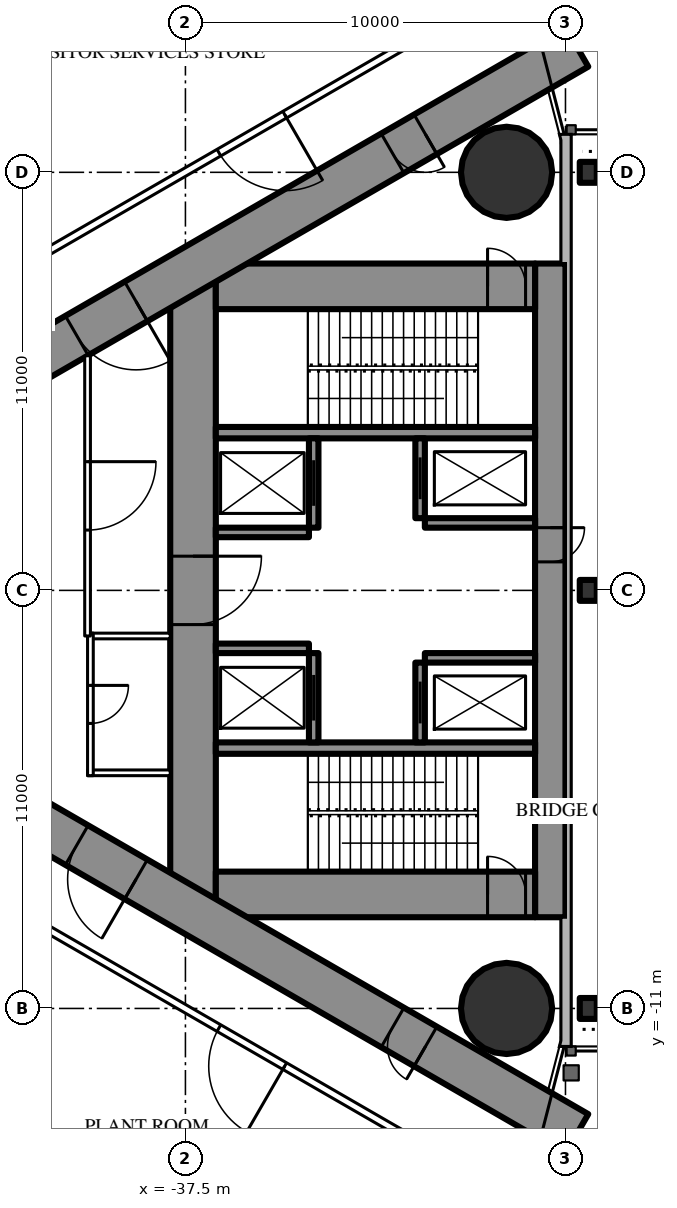
"""IFC4 building model, lengths in metres.
Left out: names, types, materials, properties, quantities, classifications, styles, units other than length and angle.
Written with IfcOpenShell. Run it as: python <this file> out.ifc"""

import sys

from ifc_helpers import new_model, si_unit, direction, frame, frame_2d, origin, origin_2d, place, context, subcontext, project, spatial, rectangle, circle, i_section, extrude, element, fill, save


model = new_model("IFC4")
c1 = context("Model", 3, precision=1e-05, world=origin(), true_north=direction((0.0, 1.0)))
c2 = subcontext(c1, "Body", "Model", "MODEL_VIEW")
j1 = project(units=[si_unit("LENGTHUNIT", "METRE"), si_unit("PLANEANGLEUNIT", "RADIAN")], contexts=[c1])
p1 = place(None, origin())
s1 = spatial("IfcSite", under=j1, at=p1, CompositionType="ELEMENT")
p2 = place(p1, origin())
s2 = spatial("IfcBuilding", under=s1, at=p2, CompositionType="ELEMENT")
p3 = place(p2, frame((0.0, 0.0, 257.3)))
s3 = spatial("IfcBuildingStorey", under=s2, at=p3, CompositionType="ELEMENT", Elevation=257.3)
for number, where, z_axis, x_axis in (
    (1, (-29.05, -11.0, 0.0), (0.0, 0.0, 1.0), (1.0, 0.0, 0.0)),
    (2, (-29.05, 11.0, 0.0), (0.0, 0.0, 1.0), (1.0, 0.0, 0.0)),
):
    element("IfcColumn", number, at=place(p3, frame(where, z_axis=z_axis, x_axis=x_axis)), inside=s3, PredefinedType="COLUMN", context=c2, shape_type="SweptSolid", body=[
        extrude(circle(Radius=1.2, at=origin_2d()), origin(), (0.0, 0.0, 1.0), 6.0),
    ])
p4 = place(p3, frame((-27.9, 8.6, 0.0), z_axis=(0.0, 0.0, 1.0), x_axis=(0.0, -1.0, 0.0)))
e3 = element("IfcWall", 3, at=p4, inside=s3, PredefinedType="SHEAR", context=c2, shape_type="SweptSolid", body=[
    extrude(rectangle(XDim=17.2, YDim=0.8, at=frame_2d((8.6, 0.0))), origin(), (0.0, 0.0, 1.0), 6.0),
])
p5 = place(p4, frame((6.95, 0.0, 0.0)))
e4 = element("IfcOpeningElement", 4, at=p5, cuts=e3, PredefinedType="OPENING", context=c2, shape_type="SweptSolid", body=[
    extrude(rectangle(XDim=0.9, YDim=2.2, at=frame_2d((0.45, 1.1))), frame((0.0, 0.41, 0.0), z_axis=(0.0, -1.0, 0.0), x_axis=(1.0, 0.0, 0.0)), (0.0, 0.0, 1.0), 0.82),
])
p6 = place(p3, frame((-37.3, 8.6, 0.0), z_axis=(0.0, 0.0, 1.0), x_axis=(0.0, -1.0, 0.0)))
e5 = element("IfcWall", 5, at=p6, inside=s3, PredefinedType="SHEAR", context=c2, shape_type="SweptSolid", body=[
    extrude(rectangle(XDim=17.2, YDim=1.2, at=frame_2d((8.6, 0.0))), origin(), (0.0, 0.0, 1.0), 6.0),
])
p7 = place(p6, frame((7.7, 0.0, 0.0)))
e6 = element("IfcOpeningElement", 6, at=p7, cuts=e5, PredefinedType="OPENING", context=c2, shape_type="SweptSolid", body=[
    extrude(rectangle(XDim=1.8, YDim=2.2, at=frame_2d((0.9, 1.1))), frame((0.0, 0.61, 0.0), z_axis=(0.0, -1.0, 0.0), x_axis=(1.0, 0.0, 0.0)), (0.0, 0.0, 1.0), 1.22),
])
p8 = place(p3, frame((-28.3, 8.0, 0.0), z_axis=(0.0, 0.0, 1.0), x_axis=(-1.0, 0.0, 0.0)))
e7 = element("IfcWall", 7, at=p8, inside=s3, PredefinedType="SHEAR", context=c2, shape_type="SweptSolid", body=[
    extrude(rectangle(XDim=8.4, YDim=1.2, at=frame_2d((4.2, 0.0))), origin(), (0.0, 0.0, 1.0), 6.0),
])
p9 = place(p8, frame((0.25, 0.0, 0.0)))
e8 = element("IfcOpeningElement", 8, at=p9, cuts=e7, PredefinedType="OPENING", context=c2, shape_type="SweptSolid", body=[
    extrude(rectangle(XDim=1.0, YDim=2.2, at=frame_2d((0.5, 1.1))), frame((0.0, 0.61, 0.0), z_axis=(0.0, -1.0, 0.0), x_axis=(1.0, 0.0, 0.0)), (0.0, 0.0, 1.0), 1.22),
])
p10 = place(p3, frame((-28.3, -8.0, 0.0), z_axis=(0.0, 0.0, 1.0), x_axis=(-1.0, 0.0, 0.0)))
e9 = element("IfcWall", 9, at=p10, inside=s3, PredefinedType="SHEAR", context=c2, shape_type="SweptSolid", body=[
    extrude(rectangle(XDim=8.4, YDim=1.2, at=frame_2d((4.2, 0.0))), origin(), (0.0, 0.0, 1.0), 6.0),
])
p11 = place(p10, frame((0.25, 0.0, 0.0)))
e10 = element("IfcOpeningElement", 10, at=p11, cuts=e9, PredefinedType="OPENING", context=c2, shape_type="SweptSolid", body=[
    extrude(rectangle(XDim=1.0, YDim=2.2, at=frame_2d((0.5, 1.1))), frame((0.0, 0.61, 0.0), z_axis=(0.0, -1.0, 0.0), x_axis=(1.0, 0.0, 0.0)), (0.0, 0.0, 1.0), 1.22),
])
for number, where, z_axis, x_axis in (
    (11, (-28.3, 4.15, 0.0), (0.0, 0.0, 1.0), (-1.0, 0.0, 0.0)),
    (12, (-28.3, -4.15, 0.0), (0.0, 0.0, 1.0), (-1.0, 0.0, 0.0)),
):
    element("IfcWall", number, at=place(p3, frame(where, z_axis=z_axis, x_axis=x_axis)), inside=s3, PredefinedType="SHEAR", context=c2, shape_type="SweptSolid", body=[
        extrude(rectangle(XDim=8.4, YDim=0.3, at=frame_2d((4.2, 0.0))), origin(), (0.0, 0.0, 1.0), 6.0),
    ])
p12 = place(p3, frame((-31.325, 4.0, 0.0), z_axis=(0.0, 0.0, 1.0), x_axis=(0.0, -1.0, 0.0)))
e13 = element("IfcWall", 13, at=p12, inside=s3, PredefinedType="SHEAR", context=c2, shape_type="SweptSolid", body=[
    extrude(rectangle(XDim=2.1, YDim=0.25, at=frame_2d((1.05, 0.0))), origin(), (0.0, 0.0, 1.0), 6.0),
])
p13 = place(p12, frame((0.5, 0.0, 0.0)))
e14 = element("IfcOpeningElement", 14, at=p13, cuts=e13, PredefinedType="OPENING", context=c2, shape_type="SweptSolid", body=[
    extrude(rectangle(XDim=1.1, YDim=2.2, at=frame_2d((0.55, 1.1))), frame((0.0, 0.135, 0.0), z_axis=(0.0, -1.0, 0.0), x_axis=(1.0, 0.0, 0.0)), (0.0, 0.0, 1.0), 0.27),
])
p14 = place(p3, frame((-34.125, 4.0, 0.0), z_axis=(0.0, 0.0, 1.0), x_axis=(0.0, -1.0, 0.0)))
e15 = element("IfcWall", 15, at=p14, inside=s3, PredefinedType="SHEAR", context=c2, shape_type="SweptSolid", body=[
    extrude(rectangle(XDim=2.35, YDim=0.25, at=frame_2d((1.175, 0.0))), origin(), (0.0, 0.0, 1.0), 6.0),
])
p15 = place(p14, frame((0.575, 0.0, 0.0)))
e16 = element("IfcOpeningElement", 16, at=p15, cuts=e15, PredefinedType="OPENING", context=c2, shape_type="SweptSolid", body=[
    extrude(rectangle(XDim=1.2, YDim=2.2, at=frame_2d((0.6, 1.1))), frame((0.0, 0.135, 0.0), z_axis=(0.0, -1.0, 0.0), x_axis=(1.0, 0.0, 0.0)), (0.0, 0.0, 1.0), 0.27),
])
p16 = place(p3, frame((-28.3, 1.775, 0.0), z_axis=(0.0, 0.0, 1.0), x_axis=(-1.0, 0.0, 0.0)))
e17 = element("IfcWall", 17, at=p16, inside=s3, PredefinedType="SHEAR", context=c2, shape_type="SweptSolid", body=[
    extrude(rectangle(XDim=2.9, YDim=0.25, at=frame_2d((1.45, 0.0))), origin(), (0.0, 0.0, 1.0), 6.0),
])
p17 = place(p3, frame((-34.25, 1.525, 0.0), z_axis=(0.0, 0.0, 1.0), x_axis=(-1.0, 0.0, 0.0)))
e18 = element("IfcWall", 18, at=p17, inside=s3, PredefinedType="SHEAR", context=c2, shape_type="SweptSolid", body=[
    extrude(rectangle(XDim=2.45, YDim=0.25, at=frame_2d((1.225, 0.0))), origin(), (0.0, 0.0, 1.0), 6.0),
])
p18 = place(p3, frame((-31.325, -1.9, 0.0), z_axis=(0.0, 0.0, 1.0), x_axis=(0.0, -1.0, 0.0)))
e19 = element("IfcWall", 19, at=p18, inside=s3, PredefinedType="SHEAR", context=c2, shape_type="SweptSolid", body=[
    extrude(rectangle(XDim=2.1, YDim=0.25, at=frame_2d((1.05, 0.0))), origin(), (0.0, 0.0, 1.0), 6.0),
])
p19 = place(p18, frame((0.5, 0.0, 0.0)))
e20 = element("IfcOpeningElement", 20, at=p19, cuts=e19, PredefinedType="OPENING", context=c2, shape_type="SweptSolid", body=[
    extrude(rectangle(XDim=1.1, YDim=2.2, at=frame_2d((0.55, 1.1))), frame((0.0, 0.135, 0.0), z_axis=(0.0, -1.0, 0.0), x_axis=(1.0, 0.0, 0.0)), (0.0, 0.0, 1.0), 0.27),
])
p20 = place(p3, frame((-34.125, -1.65, 0.0), z_axis=(0.0, 0.0, 1.0), x_axis=(0.0, -1.0, 0.0)))
e21 = element("IfcWall", 21, at=p20, inside=s3, PredefinedType="SHEAR", context=c2, shape_type="SweptSolid", body=[
    extrude(rectangle(XDim=2.35, YDim=0.25, at=frame_2d((1.175, 0.0))), origin(), (0.0, 0.0, 1.0), 6.0),
])
p21 = place(p20, frame((0.575, 0.0, 0.0)))
e22 = element("IfcOpeningElement", 22, at=p21, cuts=e21, PredefinedType="OPENING", context=c2, shape_type="SweptSolid", body=[
    extrude(rectangle(XDim=1.2, YDim=2.2, at=frame_2d((0.6, 1.1))), frame((0.0, 0.135, 0.0), z_axis=(0.0, -1.0, 0.0), x_axis=(1.0, 0.0, 0.0)), (0.0, 0.0, 1.0), 0.27),
])
p22 = place(p3, frame((-28.3, -1.775, 0.0), z_axis=(0.0, 0.0, 1.0), x_axis=(-1.0, 0.0, 0.0)))
e23 = element("IfcWall", 23, at=p22, inside=s3, PredefinedType="SHEAR", context=c2, shape_type="SweptSolid", body=[
    extrude(rectangle(XDim=2.9, YDim=0.25, at=frame_2d((1.45, 0.0))), origin(), (0.0, 0.0, 1.0), 6.0),
])
p23 = place(p3, frame((-34.25, -1.525, 0.0), z_axis=(0.0, 0.0, 1.0), x_axis=(-1.0, 0.0, 0.0)))
e24 = element("IfcWall", 24, at=p23, inside=s3, PredefinedType="SHEAR", context=c2, shape_type="SweptSolid", body=[
    extrude(rectangle(XDim=2.45, YDim=0.25, at=frame_2d((1.225, 0.0))), origin(), (0.0, 0.0, 1.0), 6.0),
])
p24 = place(p3, frame((-27.2, 14.3, 0.0), z_axis=(0.0, 0.0, 1.0), x_axis=(-0.866026593062, -0.499997940104, 0.0)))
e25 = element("IfcWall", 25, at=p24, inside=s3, PredefinedType="SHEAR", context=c2, shape_type="SweptSolid", body=[
    extrude(rectangle(XDim=28.946, YDim=1.2, at=frame_2d((14.473, 0.0))), origin(), (0.0, 0.0, 1.0), 6.0),
])
p25 = place(p24, frame((4.6, 0.0, 0.0)))
e26 = element("IfcOpeningElement", 26, at=p25, cuts=e25, PredefinedType="OPENING", context=c2, shape_type="SweptSolid", body=[
    extrude(rectangle(XDim=1.0, YDim=2.2, at=frame_2d((0.5, 1.1))), frame((0.0, 0.61, 0.0), z_axis=(0.0, -1.0, 0.0), x_axis=(1.0, 0.0, 0.0)), (0.0, 0.0, 1.0), 1.22),
])
p26 = place(p24, frame((13.395, 0.0, 0.0)))
e27 = element("IfcOpeningElement", 27, at=p26, cuts=e25, PredefinedType="OPENING", context=c2, shape_type="SweptSolid", body=[
    extrude(rectangle(XDim=1.8, YDim=2.2, at=frame_2d((0.9, 1.1))), frame((0.0, 0.61, 0.0), z_axis=(0.0, -1.0, 0.0), x_axis=(1.0, 0.0, 0.0)), (0.0, 0.0, 1.0), 1.22),
])
p27 = place(p3, frame((-27.2, -14.3, 0.0), z_axis=(0.0, 0.0, 1.0), x_axis=(-0.866024021859, 0.500002393557, 0.0)))
e28 = element("IfcWall", 28, at=p27, inside=s3, PredefinedType="SHEAR", context=c2, shape_type="SweptSolid", body=[
    extrude(rectangle(XDim=27.907, YDim=1.2, at=frame_2d((13.954, 0.0))), origin(), (0.0, 0.0, 1.0), 6.0),
])
p28 = place(p27, frame((4.6, 0.0, 0.0)))
e29 = element("IfcOpeningElement", 29, at=p28, cuts=e28, PredefinedType="OPENING", context=c2, shape_type="SweptSolid", body=[
    extrude(rectangle(XDim=1.0, YDim=2.2, at=frame_2d((0.5, 1.1))), frame((0.0, 0.61, 0.0), z_axis=(0.0, -1.0, 0.0), x_axis=(1.0, 0.0, 0.0)), (0.0, 0.0, 1.0), 1.22),
])
p29 = place(p27, frame((13.395, 0.0, 0.0)))
e30 = element("IfcOpeningElement", 30, at=p29, cuts=e28, PredefinedType="OPENING", context=c2, shape_type="SweptSolid", body=[
    extrude(rectangle(XDim=1.8, YDim=2.2, at=frame_2d((0.9, 1.1))), frame((0.0, 0.61, 0.0), z_axis=(0.0, -1.0, 0.0), x_axis=(1.0, 0.0, 0.0)), (0.0, 0.0, 1.0), 1.22),
])
for number, where, z_axis, x_axis in (
    (31, (-26.9, -11.0, 0.0), (0.0, 0.0, 1.0), (1.0, 0.0, 0.0)),
    (32, (-26.9, 0.0, 0.0), (0.0, 0.0, 1.0), (1.0, 0.0, 0.0)),
    (33, (-26.9, 11.0, 0.0), (0.0, 0.0, 1.0), (1.0, 0.0, 0.0)),
):
    element("IfcColumn", number, at=place(p3, frame(where, z_axis=z_axis, x_axis=x_axis)), inside=s3, PredefinedType="COLUMN", context=c2, shape_type="SweptSolid", body=[
        extrude(i_section(OverallWidth=0.448, OverallDepth=0.55, WebThickness=0.072, FlangeThickness=0.115, FilletRadius=0.02, at=origin_2d()), origin(), (0.0, 0.0, 1.0), 6.0),
    ])
p30 = place(p3, frame((-28.681, 16.101, 0.0), z_axis=(0.0, 0.0, 1.0), x_axis=(-0.866024860443, -0.500000941094, 0.0)))
e34 = element("IfcWall", 34, at=p30, inside=s3, PredefinedType="PARTITIONING", context=c2, shape_type="SweptSolid", body=[
    extrude(rectangle(XDim=32.201, YDim=0.2, at=frame_2d((16.101, 0.0))), origin(), (0.0, 0.0, 1.0), 5.75),
])
p31 = place(p30, frame((7.166, 0.0, 0.0)))
e35 = element("IfcOpeningElement", 35, at=p31, cuts=e34, PredefinedType="OPENING", context=c2, shape_type="SweptSolid", body=[
    extrude(rectangle(XDim=2.0, YDim=2.4, at=frame_2d((1.0, 1.2))), frame((0.0, 0.11, 0.0), z_axis=(0.0, -1.0, 0.0), x_axis=(1.0, 0.0, 0.0)), (0.0, 0.0, 1.0), 0.22),
])
p32 = place(p30, frame((17.281, 0.0, 0.0)))
e36 = element("IfcOpeningElement", 36, at=p32, cuts=e34, PredefinedType="OPENING", context=c2, shape_type="SweptSolid", body=[
    extrude(rectangle(XDim=1.8, YDim=2.2, at=frame_2d((0.9, 1.1))), frame((0.0, 0.11, 0.0), z_axis=(0.0, -1.0, 0.0), x_axis=(1.0, 0.0, 0.0)), (0.0, 0.0, 1.0), 0.22),
])
p33 = place(p30, frame((21.43, 0.0, 0.0)))
e37 = element("IfcOpeningElement", 37, at=p33, cuts=e34, PredefinedType="OPENING", context=c2, shape_type="SweptSolid", body=[
    extrude(rectangle(XDim=1.8, YDim=2.2, at=frame_2d((0.9, 1.1))), frame((0.0, 0.11, 0.0), z_axis=(0.0, -1.0, 0.0), x_axis=(1.0, 0.0, 0.0)), (0.0, 0.0, 1.0), 0.22),
])
p34 = place(p30, frame((27.19, 0.0, 0.0)))
e38 = element("IfcOpeningElement", 38, at=p34, cuts=e34, PredefinedType="OPENING", context=c2, shape_type="SweptSolid", body=[
    extrude(rectangle(XDim=2.0, YDim=2.4, at=frame_2d((1.0, 1.2))), frame((0.0, 0.11, 0.0), z_axis=(0.0, -1.0, 0.0), x_axis=(1.0, 0.0, 0.0)), (0.0, 0.0, 1.0), 0.22),
])
p35 = place(p3, frame((-28.681, -16.101, 0.0), z_axis=(0.0, 0.0, 1.0), x_axis=(-0.86602501917, 0.50000066617, 0.0)))
e39 = element("IfcWall", 39, at=p35, inside=s3, PredefinedType="PARTITIONING", context=c2, shape_type="SweptSolid", body=[
    extrude(rectangle(XDim=32.081, YDim=0.2, at=frame_2d((16.041, 0.0))), origin(), (0.0, 0.0, 1.0), 5.75),
])
p36 = place(p35, frame((27.13, 0.0, 0.0)))
e40 = element("IfcOpeningElement", 40, at=p36, cuts=e39, PredefinedType="OPENING", context=c2, shape_type="SweptSolid", body=[
    extrude(rectangle(XDim=2.0, YDim=2.4, at=frame_2d((1.0, 1.2))), frame((0.0, 0.11, 0.0), z_axis=(0.0, -1.0, 0.0), x_axis=(1.0, 0.0, 0.0)), (0.0, 0.0, 1.0), 0.22),
])
p37 = place(p35, frame((21.43, 0.0, 0.0)))
e41 = element("IfcOpeningElement", 41, at=p37, cuts=e39, PredefinedType="OPENING", context=c2, shape_type="SweptSolid", body=[
    extrude(rectangle(XDim=1.8, YDim=2.2, at=frame_2d((0.9, 1.1))), frame((0.0, 0.11, 0.0), z_axis=(0.0, -1.0, 0.0), x_axis=(1.0, 0.0, 0.0)), (0.0, 0.0, 1.0), 0.22),
])
p38 = place(p35, frame((17.281, 0.0, 0.0)))
e42 = element("IfcOpeningElement", 42, at=p38, cuts=e39, PredefinedType="OPENING", context=c2, shape_type="SweptSolid", body=[
    extrude(rectangle(XDim=1.8, YDim=2.2, at=frame_2d((0.9, 1.1))), frame((0.0, 0.11, 0.0), z_axis=(0.0, -1.0, 0.0), x_axis=(1.0, 0.0, 0.0)), (0.0, 0.0, 1.0), 0.22),
])
p39 = place(p35, frame((7.166, 0.0, 0.0)))
e43 = element("IfcOpeningElement", 43, at=p39, cuts=e39, PredefinedType="OPENING", context=c2, shape_type="SweptSolid", body=[
    extrude(rectangle(XDim=2.0, YDim=2.4, at=frame_2d((1.0, 1.2))), frame((0.0, 0.11, 0.0), z_axis=(0.0, -1.0, 0.0), x_axis=(1.0, 0.0, 0.0)), (0.0, 0.0, 1.0), 0.22),
])
for number, where, z_axis, x_axis in (
    (44, (-37.9, -1.2, 0.0), (0.0, 0.0, 1.0), (-1.0, 0.0, 0.0)),
    (45, (-37.9, -4.8, 0.0), (0.0, 0.0, 1.0), (-1.0, 0.0, 0.0)),
):
    element("IfcWall", number, at=place(p3, frame(where, z_axis=z_axis, x_axis=x_axis)), inside=s3, PredefinedType="PARTITIONING", context=c2, shape_type="SweptSolid", body=[
        extrude(rectangle(XDim=2.175, YDim=0.15, at=frame_2d((1.087, 0.0))), origin(), (0.0, 0.0, 1.0), 5.75),
    ])
p40 = place(p3, frame((-40.0, -1.125, 0.0), z_axis=(0.0, 0.0, 1.0), x_axis=(0.0, -1.0, 0.0)))
e46 = element("IfcWall", 46, at=p40, inside=s3, PredefinedType="PARTITIONING", context=c2, shape_type="SweptSolid", body=[
    extrude(rectangle(XDim=3.75, YDim=0.15, at=frame_2d((1.875, 0.0))), origin(), (0.0, 0.0, 1.0), 5.75),
])
p41 = place(p40, frame((1.375, 0.0, 0.0)))
e47 = element("IfcOpeningElement", 47, at=p41, cuts=e46, PredefinedType="OPENING", context=c2, shape_type="SweptSolid", body=[
    extrude(rectangle(XDim=1.0, YDim=2.2, at=frame_2d((0.5, 1.1))), frame((0.0, 0.085, 0.0), z_axis=(0.0, -1.0, 0.0), x_axis=(1.0, 0.0, 0.0)), (0.0, 0.0, 1.0), 0.17),
])
p42 = place(p3, frame((-40.075, 6.174, 0.0), z_axis=(0.0, 0.0, 1.0), x_axis=(0.0, -1.0, 0.0)))
e48 = element("IfcWall", 48, at=p42, inside=s3, PredefinedType="PARTITIONING", context=c2, shape_type="SweptSolid", body=[
    extrude(rectangle(XDim=7.374, YDim=0.15, at=frame_2d((3.687, 0.0))), origin(), (0.0, 0.0, 1.0), 5.75),
])
p43 = place(p42, frame((2.787, 0.0, 0.0)))
e49 = element("IfcOpeningElement", 49, at=p43, cuts=e48, PredefinedType="OPENING", context=c2, shape_type="SweptSolid", body=[
    extrude(rectangle(XDim=1.8, YDim=2.2, at=frame_2d((0.9, 1.1))), frame((0.0, 0.085, 0.0), z_axis=(0.0, -1.0, 0.0), x_axis=(1.0, 0.0, 0.0)), (0.0, 0.0, 1.0), 0.17),
])
p44 = place(p31, origin())
e50 = element("IfcDoor", 50, at=p44, inside=s3, OperationType="DOUBLE_DOOR_SINGLE_SWING", PredefinedType="DOOR", context=c2, shape_type="SweptSolid", body=[
    extrude(rectangle(XDim=2.0, YDim=2.4, at=frame_2d((1.0, 1.2))), frame((0.0, 0.025, 0.0), z_axis=(0.0, -1.0, 0.0), x_axis=(1.0, 0.0, 0.0)), (0.0, 0.0, 1.0), 0.05),
])
fill(e35, e50)
p45 = place(p39, origin())
e51 = element("IfcDoor", 51, at=p45, inside=s3, OperationType="DOUBLE_DOOR_SINGLE_SWING", PredefinedType="DOOR", context=c2, shape_type="SweptSolid", body=[
    extrude(rectangle(XDim=2.0, YDim=2.4, at=frame_2d((1.0, 1.2))), frame((0.0, 0.025, 0.0), z_axis=(0.0, -1.0, 0.0), x_axis=(1.0, 0.0, 0.0)), (0.0, 0.0, 1.0), 0.05),
])
fill(e43, e51)
p46 = place(p41, origin())
e52 = element("IfcDoor", 52, at=p46, inside=s3, OperationType="SINGLE_SWING_LEFT", PredefinedType="DOOR", context=c2, shape_type="SweptSolid", body=[
    extrude(rectangle(XDim=1.0, YDim=2.2, at=frame_2d((0.5, 1.1))), frame((0.0, 0.025, 0.0), z_axis=(0.0, -1.0, 0.0), x_axis=(1.0, 0.0, 0.0)), (0.0, 0.0, 1.0), 0.05),
])
fill(e47, e52)
p47 = place(p43, origin())
e53 = element("IfcDoor", 53, at=p47, inside=s3, OperationType="DOUBLE_DOOR_SINGLE_SWING", PredefinedType="DOOR", context=c2, shape_type="SweptSolid", body=[
    extrude(rectangle(XDim=1.8, YDim=2.2, at=frame_2d((0.9, 1.1))), frame((0.0, 0.025, 0.0), z_axis=(0.0, -1.0, 0.0), x_axis=(1.0, 0.0, 0.0)), (0.0, 0.0, 1.0), 0.05),
])
fill(e49, e53)
p48 = place(p25, origin())
e54 = element("IfcDoor", 54, at=p48, inside=s3, OperationType="SINGLE_SWING_LEFT", PredefinedType="DOOR", context=c2, shape_type="SweptSolid", body=[
    extrude(rectangle(XDim=1.0, YDim=2.2, at=frame_2d((0.5, 1.1))), frame((0.0, 0.025, 0.0), z_axis=(0.0, -1.0, 0.0), x_axis=(1.0, 0.0, 0.0)), (0.0, 0.0, 1.0), 0.05),
])
fill(e26, e54)
p49 = place(p26, origin())
e55 = element("IfcDoor", 55, at=p49, inside=s3, OperationType="DOUBLE_DOOR_SINGLE_SWING", PredefinedType="DOOR", context=c2, shape_type="SweptSolid", body=[
    extrude(rectangle(XDim=1.8, YDim=2.2, at=frame_2d((0.9, 1.1))), frame((0.0, 0.025, 0.0), z_axis=(0.0, -1.0, 0.0), x_axis=(1.0, 0.0, 0.0)), (0.0, 0.0, 1.0), 0.05),
])
fill(e27, e55)
p50 = place(p28, origin())
e56 = element("IfcDoor", 56, at=p50, inside=s3, OperationType="SINGLE_SWING_LEFT", PredefinedType="DOOR", context=c2, shape_type="SweptSolid", body=[
    extrude(rectangle(XDim=1.0, YDim=2.2, at=frame_2d((0.5, 1.1))), frame((0.0, 0.025, 0.0), z_axis=(0.0, -1.0, 0.0), x_axis=(1.0, 0.0, 0.0)), (0.0, 0.0, 1.0), 0.05),
])
fill(e29, e56)
p51 = place(p29, origin())
e57 = element("IfcDoor", 57, at=p51, inside=s3, OperationType="DOUBLE_DOOR_SINGLE_SWING", PredefinedType="DOOR", context=c2, shape_type="SweptSolid", body=[
    extrude(rectangle(XDim=1.8, YDim=2.2, at=frame_2d((0.9, 1.1))), frame((0.0, 0.025, 0.0), z_axis=(0.0, -1.0, 0.0), x_axis=(1.0, 0.0, 0.0)), (0.0, 0.0, 1.0), 0.05),
])
fill(e30, e57)
p52 = place(p7, origin())
e58 = element("IfcDoor", 58, at=p52, inside=s3, OperationType="DOUBLE_DOOR_SINGLE_SWING", PredefinedType="DOOR", context=c2, shape_type="SweptSolid", body=[
    extrude(rectangle(XDim=1.8, YDim=2.2, at=frame_2d((0.9, 1.1))), frame((0.0, 0.025, 0.0), z_axis=(0.0, -1.0, 0.0), x_axis=(1.0, 0.0, 0.0)), (0.0, 0.0, 1.0), 0.05),
])
fill(e6, e58)
p53 = place(p9, origin())
e59 = element("IfcDoor", 59, at=p53, inside=s3, OperationType="SINGLE_SWING_RIGHT", PredefinedType="DOOR", context=c2, shape_type="SweptSolid", body=[
    extrude(rectangle(XDim=1.0, YDim=2.2, at=frame_2d((0.5, 1.1))), frame((0.0, 0.025, 0.0), z_axis=(0.0, -1.0, 0.0), x_axis=(1.0, 0.0, 0.0)), (0.0, 0.0, 1.0), 0.05),
])
fill(e8, e59)
p54 = place(p11, origin())
e60 = element("IfcDoor", 60, at=p54, inside=s3, OperationType="SINGLE_SWING_RIGHT", PredefinedType="DOOR", context=c2, shape_type="SweptSolid", body=[
    extrude(rectangle(XDim=1.0, YDim=2.2, at=frame_2d((0.5, 1.1))), frame((0.0, 0.025, 0.0), z_axis=(0.0, -1.0, 0.0), x_axis=(1.0, 0.0, 0.0)), (0.0, 0.0, 1.0), 0.05),
])
fill(e10, e60)
p55 = place(p5, origin())
e61 = element("IfcDoor", 61, at=p55, inside=s3, OperationType="SINGLE_SWING_LEFT", PredefinedType="DOOR", context=c2, shape_type="SweptSolid", body=[
    extrude(rectangle(XDim=0.9, YDim=2.2, at=frame_2d((0.45, 1.1))), frame((0.0, 0.025, 0.0), z_axis=(0.0, -1.0, 0.0), x_axis=(1.0, 0.0, 0.0)), (0.0, 0.0, 1.0), 0.05),
])
fill(e4, e61)
p56 = place(p13, origin())
e62 = element("IfcDoor", 62, at=p56, inside=s3, OperationType="SLIDING_TO_LEFT", PredefinedType="USERDEFINED", context=c2, shape_type="SweptSolid", body=[
    extrude(rectangle(XDim=1.1, YDim=2.2, at=frame_2d((0.55, 1.1))), frame((0.0, 0.025, 0.0), z_axis=(0.0, -1.0, 0.0), x_axis=(1.0, 0.0, 0.0)), (0.0, 0.0, 1.0), 0.05),
])
fill(e14, e62)
p57 = place(p19, origin())
e63 = element("IfcDoor", 63, at=p57, inside=s3, OperationType="SLIDING_TO_LEFT", PredefinedType="USERDEFINED", context=c2, shape_type="SweptSolid", body=[
    extrude(rectangle(XDim=1.1, YDim=2.2, at=frame_2d((0.55, 1.1))), frame((0.0, 0.025, 0.0), z_axis=(0.0, -1.0, 0.0), x_axis=(1.0, 0.0, 0.0)), (0.0, 0.0, 1.0), 0.05),
])
fill(e20, e63)
p58 = place(p15, origin())
e64 = element("IfcDoor", 64, at=p58, inside=s3, OperationType="DOUBLE_DOOR_SLIDING", PredefinedType="USERDEFINED", context=c2, shape_type="SweptSolid", body=[
    extrude(rectangle(XDim=1.2, YDim=2.2, at=frame_2d((0.6, 1.1))), frame((0.0, 0.025, 0.0), z_axis=(0.0, -1.0, 0.0), x_axis=(1.0, 0.0, 0.0)), (0.0, 0.0, 1.0), 0.05),
])
fill(e16, e64)
p59 = place(p21, origin())
e65 = element("IfcDoor", 65, at=p59, inside=s3, OperationType="DOUBLE_DOOR_SLIDING", PredefinedType="USERDEFINED", context=c2, shape_type="SweptSolid", body=[
    extrude(rectangle(XDim=1.2, YDim=2.2, at=frame_2d((0.6, 1.1))), frame((0.0, 0.025, 0.0), z_axis=(0.0, -1.0, 0.0), x_axis=(1.0, 0.0, 0.0)), (0.0, 0.0, 1.0), 0.05),
])
fill(e22, e65)
save(model, sys.argv[1])
